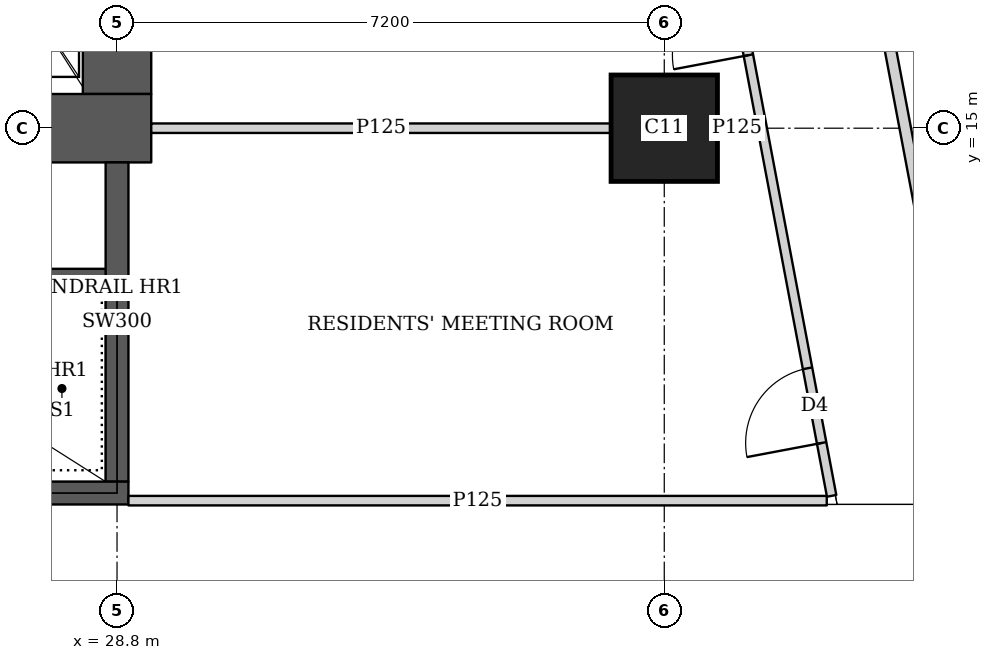
"""IFC4 building model, lengths in metres.
Left out: names, types, materials, properties, quantities, classifications, styles, units other than length and angle.
Written with IfcOpenShell. Run it as: python <this file> out.ifc"""

import sys

from ifc_helpers import new_model, si_unit, direction, frame, frame_2d, origin, origin_2d, place, context, subcontext, project, spatial, rectangle, extrude, element, fill, save


model = new_model("IFC4")
c1 = context("Model", 3, precision=1e-05, world=origin(), true_north=direction((0.0, 1.0)))
c2 = subcontext(c1, "Body", "Model", "MODEL_VIEW")
j1 = project(units=[si_unit("LENGTHUNIT", "METRE"), si_unit("PLANEANGLEUNIT", "RADIAN")], contexts=[c1])
p1 = place(None, origin())
s1 = spatial("IfcSite", under=j1, at=p1, CompositionType="ELEMENT")
p2 = place(p1, origin())
s2 = spatial("IfcBuilding", under=s1, at=p2, CompositionType="ELEMENT")
p3 = place(p2, frame((0.0, 0.0, 262.85)))
s3 = spatial("IfcBuildingStorey", under=s2, at=p3, CompositionType="ELEMENT", Elevation=262.85)
p4 = place(p3, frame((36.0, 15.0, 0.0), z_axis=(0.0, 0.0, 1.0), x_axis=(1.0, 0.0, 0.0)))
e1 = element("IfcColumn", 1, at=p4, inside=s3, PredefinedType="COLUMN", context=c2, shape_type="SweptSolid", body=[
    extrude(rectangle(XDim=1.4, YDim=1.4, at=origin_2d()), origin(), (0.0, 0.0, 1.0), 3.75),
])
p5 = place(p3, frame((13.95, 15.0, 0.0), z_axis=(0.0, 0.0, 1.0), x_axis=(1.0, 0.0, 0.0)))
e2 = element("IfcWall", 2, at=p5, inside=s3, PredefinedType="SHEAR", context=c2, shape_type="SweptSolid", body=[
    extrude(rectangle(XDim=15.3, YDim=0.9, at=frame_2d((7.65, 0.0))), origin(), (0.0, 0.0, 1.0), 3.75),
])
p6 = place(p5, frame((4.45, 0.0, 0.0)))
e3 = element("IfcOpeningElement", 3, at=p6, cuts=e2, PredefinedType="OPENING", context=c2, shape_type="SweptSolid", body=[
    extrude(rectangle(XDim=1.8, YDim=2.1, at=frame_2d((0.9, 1.05))), frame((0.0, 0.46, 0.0), z_axis=(0.0, -1.0, 0.0), x_axis=(1.0, 0.0, 0.0)), (0.0, 0.0, 1.0), 0.92),
])
p7 = place(p5, frame((10.7, 0.0, 0.0)))
e4 = element("IfcOpeningElement", 4, at=p7, cuts=e2, PredefinedType="OPENING", context=c2, shape_type="SweptSolid", body=[
    extrude(rectangle(XDim=1.1, YDim=2.1, at=frame_2d((0.55, 1.05))), frame((0.0, 0.46, 0.0), z_axis=(0.0, -1.0, 0.0), x_axis=(1.0, 0.0, 0.0)), (0.0, 0.0, 1.0), 0.92),
])
p8 = place(p3, frame((28.8, 15.45, 0.0), z_axis=(0.0, 0.0, 1.0), x_axis=(0.0, 1.0, 0.0)))
e5 = element("IfcWall", 5, at=p8, inside=s3, PredefinedType="SHEAR", context=c2, shape_type="SweptSolid", body=[
    extrude(rectangle(XDim=14.1, YDim=0.9, at=frame_2d((7.05, 0.0))), origin(), (0.0, 0.0, 1.0), 3.75),
])
p9 = place(p3, frame((21.45, 10.2, 0.0), z_axis=(0.0, 0.0, 1.0), x_axis=(1.0, 0.0, 0.0)))
e6 = element("IfcWall", 6, at=p9, inside=s3, PredefinedType="SHEAR", context=c2, shape_type="SweptSolid", body=[
    extrude(rectangle(XDim=7.5, YDim=0.3, at=frame_2d((3.75, 0.0))), origin(), (0.0, 0.0, 1.0), 3.75),
])
p10 = place(p9, frame((1.2, 0.0, 0.0)))
e7 = element("IfcOpeningElement", 7, at=p10, cuts=e6, PredefinedType="OPENING", context=c2, shape_type="SweptSolid", body=[
    extrude(rectangle(XDim=1.1, YDim=2.1, at=frame_2d((0.55, 1.05))), frame((0.0, 0.16, 0.0), z_axis=(0.0, -1.0, 0.0), x_axis=(1.0, 0.0, 0.0)), (0.0, 0.0, 1.0), 0.32),
])
p11 = place(p3, frame((28.8, 10.35, 0.0), z_axis=(0.0, 0.0, 1.0), x_axis=(0.0, 1.0, 0.0)))
e8 = element("IfcWall", 8, at=p11, inside=s3, PredefinedType="SHEAR", context=c2, shape_type="SweptSolid", body=[
    extrude(rectangle(XDim=4.2, YDim=0.3, at=frame_2d((2.1, 0.0))), origin(), (0.0, 0.0, 1.0), 3.75),
])
p12 = place(p3, frame((34.036, 42.186, 0.0), z_axis=(0.0, 0.0, 1.0), x_axis=(0.185593518645, -0.9826266055, 0.0)))
e9 = element("IfcWall", 9, at=p12, inside=s3, PredefinedType="SOLIDWALL", context=c2, shape_type="SweptSolid", body=[
    extrude(rectangle(XDim=35.961, YDim=0.15, at=frame_2d((17.98, 0.0))), origin(), (0.0, 0.0, 1.0), 2.5),
])
p13 = place(p12, frame((15.529, 0.0, 0.0)))
e10 = element("IfcOpeningElement", 10, at=p13, cuts=e9, PredefinedType="OPENING", context=c2, shape_type="SweptSolid", body=[
    extrude(rectangle(XDim=1.0, YDim=2.1, at=frame_2d((0.5, 1.05))), frame((0.0, 0.085, 0.0), z_axis=(0.0, -1.0, 0.0), x_axis=(1.0, 0.0, 0.0)), (0.0, 0.0, 1.0), 0.17),
])
p14 = place(p12, frame((19.345, 0.0, 0.0)))
e11 = element("IfcOpeningElement", 11, at=p14, cuts=e9, PredefinedType="OPENING", context=c2, shape_type="SweptSolid", body=[
    extrude(rectangle(XDim=1.0, YDim=2.1, at=frame_2d((0.5, 1.05))), frame((0.0, 0.085, 0.0), z_axis=(0.0, -1.0, 0.0), x_axis=(1.0, 0.0, 0.0)), (0.0, 0.0, 1.0), 0.17),
])
p15 = place(p12, frame((30.594, 0.0, 0.0)))
e12 = element("IfcOpeningElement", 12, at=p15, cuts=e9, PredefinedType="OPENING", context=c2, shape_type="SweptSolid", body=[
    extrude(rectangle(XDim=1.0, YDim=2.1, at=frame_2d((0.5, 1.05))), frame((0.0, 0.085, 0.0), z_axis=(0.0, -1.0, 0.0), x_axis=(1.0, 0.0, 0.0)), (0.0, 0.0, 1.0), 0.17),
])
p16 = place(p3, frame((28.95, 10.1, 0.0), z_axis=(0.0, 0.0, 1.0), x_axis=(1.0, 0.0, 0.0)))
e13 = element("IfcWall", 13, at=p16, inside=s3, PredefinedType="PARTITIONING", context=c2, shape_type="SweptSolid", body=[
    extrude(rectangle(XDim=9.188, YDim=0.125, at=frame_2d((4.594, 0.0))), origin(), (0.0, 0.0, 1.0), 3.5),
])
p17 = place(p3, frame((38.202, 10.163, 0.0), z_axis=(0.0, 0.0, 1.0), x_axis=(-0.185610321132, 0.982623431783, 0.0)))
e14 = element("IfcWall", 14, at=p17, inside=s3, PredefinedType="PARTITIONING", context=c2, shape_type="SweptSolid", body=[
    extrude(rectangle(XDim=25.111, YDim=0.125, at=frame_2d((12.556, 0.0))), origin(), (0.0, 0.0, 1.0), 2.5),
])
p18 = place(p17, frame((0.708, 0.0, 0.0)))
e15 = element("IfcOpeningElement", 15, at=p18, cuts=e14, PredefinedType="OPENING", context=c2, shape_type="SweptSolid", body=[
    extrude(rectangle(XDim=1.0, YDim=2.1, at=frame_2d((0.5, 1.05))), frame((0.0, 0.073, 0.0), z_axis=(0.0, -1.0, 0.0), x_axis=(1.0, 0.0, 0.0)), (0.0, 0.0, 1.0), 0.145),
])
p19 = place(p17, frame((5.9, 0.0, 0.0)))
e16 = element("IfcOpeningElement", 16, at=p19, cuts=e14, PredefinedType="OPENING", context=c2, shape_type="SweptSolid", body=[
    extrude(rectangle(XDim=1.0, YDim=2.1, at=frame_2d((0.5, 1.05))), frame((0.0, 0.073, 0.0), z_axis=(0.0, -1.0, 0.0), x_axis=(1.0, 0.0, 0.0)), (0.0, 0.0, 1.0), 0.145),
])
p20 = place(p17, frame((13.378, 0.0, 0.0)))
e17 = element("IfcOpeningElement", 17, at=p20, cuts=e14, PredefinedType="OPENING", context=c2, shape_type="SweptSolid", body=[
    extrude(rectangle(XDim=1.0, YDim=2.1, at=frame_2d((0.5, 1.05))), frame((0.0, 0.073, 0.0), z_axis=(0.0, -1.0, 0.0), x_axis=(1.0, 0.0, 0.0)), (0.0, 0.0, 1.0), 0.145),
])
p21 = place(p17, frame((17.194, 0.0, 0.0)))
e18 = element("IfcOpeningElement", 18, at=p21, cuts=e14, PredefinedType="OPENING", context=c2, shape_type="SweptSolid", body=[
    extrude(rectangle(XDim=1.0, YDim=2.1, at=frame_2d((0.5, 1.05))), frame((0.0, 0.073, 0.0), z_axis=(0.0, -1.0, 0.0), x_axis=(1.0, 0.0, 0.0)), (0.0, 0.0, 1.0), 0.145),
])
p22 = place(p17, frame((21.15, 0.0, 0.0)))
e19 = element("IfcOpeningElement", 19, at=p22, cuts=e14, PredefinedType="OPENING", context=c2, shape_type="SweptSolid", body=[
    extrude(rectangle(XDim=1.0, YDim=2.1, at=frame_2d((0.5, 1.05))), frame((0.0, 0.073, 0.0), z_axis=(0.0, -1.0, 0.0), x_axis=(1.0, 0.0, 0.0)), (0.0, 0.0, 1.0), 0.145),
])
p23 = place(p3, frame((29.25, 15.0, 0.0), z_axis=(0.0, 0.0, 1.0), x_axis=(1.0, 0.0, 0.0)))
e20 = element("IfcWall", 20, at=p23, inside=s3, PredefinedType="PARTITIONING", context=c2, shape_type="SweptSolid", body=[
    extrude(rectangle(XDim=6.049, YDim=0.125, at=frame_2d((3.024, 0.0))), origin(), (0.0, 0.0, 1.0), 3.5),
])
p24 = place(p3, frame((36.701, 15.0, 0.0), z_axis=(0.0, 0.0, 1.0), x_axis=(1.0, 0.0, 0.0)))
e21 = element("IfcWall", 21, at=p24, inside=s3, PredefinedType="PARTITIONING", context=c2, shape_type="SweptSolid", body=[
    extrude(rectangle(XDim=0.512, YDim=0.125, at=frame_2d((0.256, 0.0))), origin(), (0.0, 0.0, 1.0), 3.5),
])
p25 = place(p3, frame((23.0, 13.05, 0.0), z_axis=(0.0, 0.0, 1.0), x_axis=(1.0, 0.0, 0.0)))
e22 = element("IfcWall", 22, at=p25, inside=s3, PredefinedType="SHEAR", context=c2, shape_type="SweptSolid", body=[
    extrude(rectangle(XDim=5.8, YDim=0.2, at=frame_2d((2.9, 0.0))), origin(), (0.0, 0.0, 1.0), 3.75),
])
p26 = place(p18, origin())
e23 = element("IfcDoor", 23, at=p26, inside=s3, OperationType="SINGLE_SWING_LEFT", PredefinedType="DOOR", context=c2, shape_type="SweptSolid", body=[
    extrude(rectangle(XDim=1.0, YDim=2.1, at=frame_2d((0.5, 1.05))), frame((0.0, 0.025, 0.0), z_axis=(0.0, -1.0, 0.0), x_axis=(1.0, 0.0, 0.0)), (0.0, 0.0, 1.0), 0.05),
])
fill(e15, e23)
p27 = place(p19, origin())
e24 = element("IfcDoor", 24, at=p27, inside=s3, OperationType="SINGLE_SWING_LEFT", PredefinedType="DOOR", context=c2, shape_type="SweptSolid", body=[
    extrude(rectangle(XDim=1.0, YDim=2.1, at=frame_2d((0.5, 1.05))), frame((0.0, 0.025, 0.0), z_axis=(0.0, -1.0, 0.0), x_axis=(1.0, 0.0, 0.0)), (0.0, 0.0, 1.0), 0.05),
])
fill(e16, e24)
save(model, sys.argv[1])
